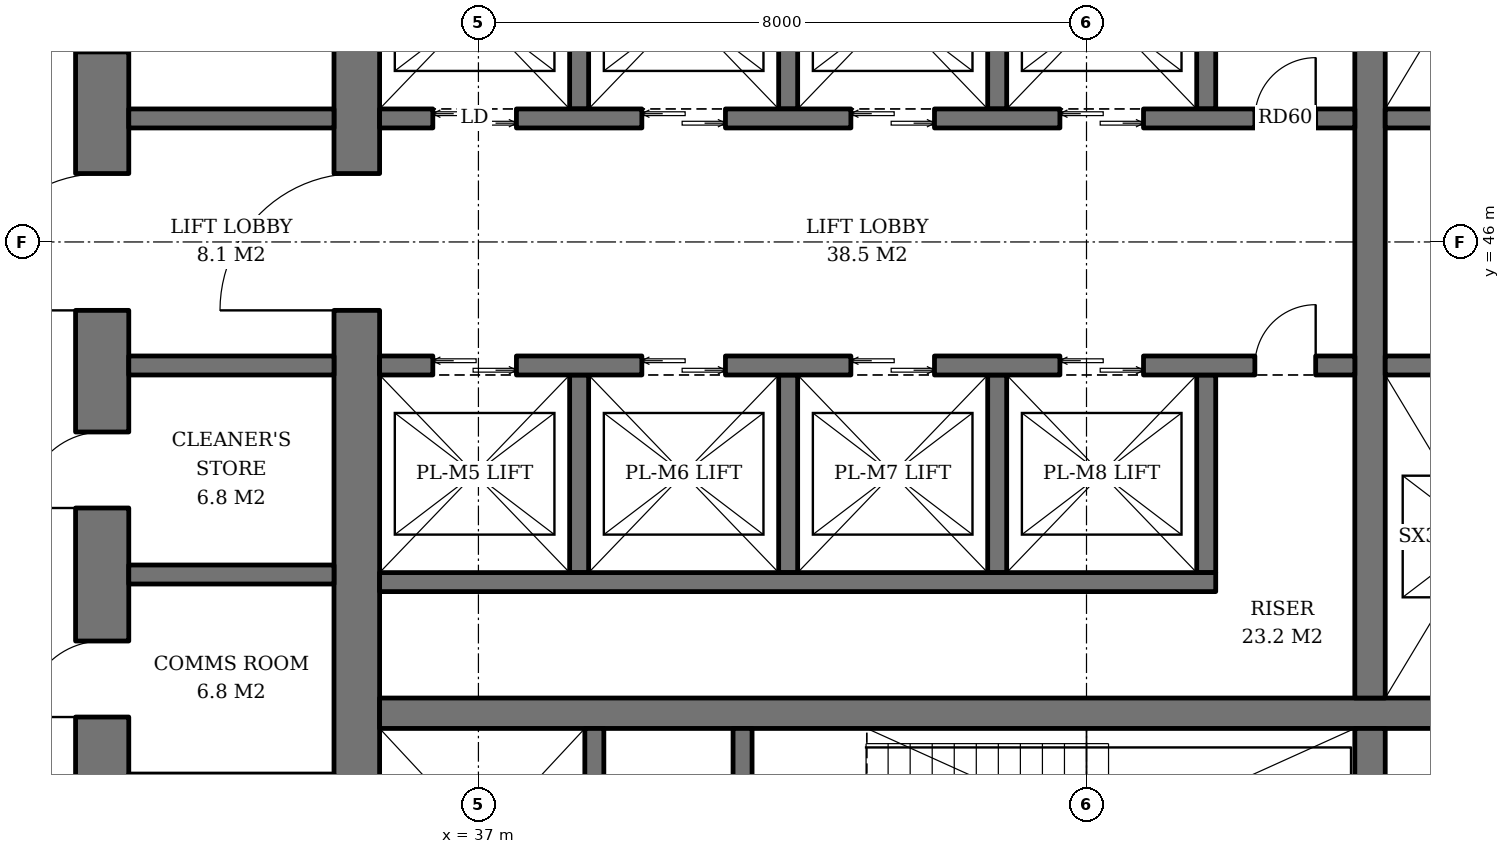
"""IFC4 building model, lengths in metres.
Left out: names, types, materials, properties, quantities, classifications, styles, units other than length and angle.
Written with IfcOpenShell. Run it as: python <this file> out.ifc"""

import sys

from ifc_helpers import new_model, si_unit, direction, frame, frame_2d, origin, place, context, subcontext, project, spatial, rectangle, extrude, element, fill, save


model = new_model("IFC4")
c1 = context("Model", 3, precision=1e-05, world=origin(), true_north=direction((0.0, 1.0)))
c2 = subcontext(c1, "Body", "Model", "MODEL_VIEW")
j1 = project(units=[si_unit("LENGTHUNIT", "METRE"), si_unit("PLANEANGLEUNIT", "RADIAN")], contexts=[c1])
p1 = place(None, origin())
s1 = spatial("IfcSite", under=j1, at=p1, CompositionType="ELEMENT")
p2 = place(p1, origin())
s2 = spatial("IfcBuilding", under=s1, at=p2, CompositionType="ELEMENT")
p3 = place(p2, frame((0.0, 0.0, 104.6)))
s3 = spatial("IfcBuildingStorey", under=s2, at=p3, CompositionType="ELEMENT", Elevation=104.6)
p4 = place(p3, frame((35.4, 36.7, 0.0), z_axis=(0.0, 0.0, 1.0), x_axis=(0.0, 1.0, 0.0)))
e1 = element("IfcWall", 1, at=p4, inside=s3, PredefinedType="SHEAR", context=c2, shape_type="SweptSolid", body=[
    extrude(rectangle(XDim=18.6, YDim=0.6, at=frame_2d((9.3, 0.0))), origin(), (0.0, 0.0, 1.0), 3.8),
])
p5 = place(p4, frame((8.4, 0.0, 0.0)))
e2 = element("IfcOpeningElement", 2, at=p5, cuts=e1, PredefinedType="OPENING", context=c2, shape_type="SweptSolid", body=[
    extrude(rectangle(XDim=1.8, YDim=2.4, at=frame_2d((0.9, 1.2))), frame((0.0, 0.31, 0.0), z_axis=(0.0, -1.0, 0.0), x_axis=(1.0, 0.0, 0.0)), (0.0, 0.0, 1.0), 0.62),
])
p6 = place(p3, frame((32.05, 33.4, 0.0), z_axis=(0.0, 0.0, 1.0), x_axis=(0.0, 1.0, 0.0)))
e3 = element("IfcWall", 3, at=p6, inside=s3, PredefinedType="SHEAR", context=c2, shape_type="SweptSolid", body=[
    extrude(rectangle(XDim=25.2, YDim=0.7, at=frame_2d((12.6, 0.0))), origin(), (0.0, 0.0, 1.0), 3.8),
])
p7 = place(p6, frame((11.7, 0.0, 0.0)))
e4 = element("IfcOpeningElement", 4, at=p7, cuts=e3, PredefinedType="OPENING", context=c2, shape_type="SweptSolid", body=[
    extrude(rectangle(XDim=1.8, YDim=2.4, at=frame_2d((0.9, 1.2))), frame((0.0, 0.36, 0.0), z_axis=(0.0, -1.0, 0.0), x_axis=(1.0, 0.0, 0.0)), (0.0, 0.0, 1.0), 0.72),
])
p8 = place(p6, frame((3.6, 0.0, 0.0)))
e5 = element("IfcOpeningElement", 5, at=p8, cuts=e3, PredefinedType="OPENING", context=c2, shape_type="SweptSolid", body=[
    extrude(rectangle(XDim=1.0, YDim=2.1, at=frame_2d((0.5, 1.05))), frame((0.0, 0.36, 0.0), z_axis=(0.0, -1.0, 0.0), x_axis=(1.0, 0.0, 0.0)), (0.0, 0.0, 1.0), 0.72),
])
p9 = place(p6, frame((6.35, 0.0, 0.0)))
e6 = element("IfcOpeningElement", 6, at=p9, cuts=e3, PredefinedType="OPENING", context=c2, shape_type="SweptSolid", body=[
    extrude(rectangle(XDim=1.0, YDim=2.1, at=frame_2d((0.5, 1.05))), frame((0.0, 0.36, 0.0), z_axis=(0.0, -1.0, 0.0), x_axis=(1.0, 0.0, 0.0)), (0.0, 0.0, 1.0), 0.72),
])
p10 = place(p6, frame((9.1, 0.0, 0.0)))
e7 = element("IfcOpeningElement", 7, at=p10, cuts=e3, PredefinedType="OPENING", context=c2, shape_type="SweptSolid", body=[
    extrude(rectangle(XDim=1.0, YDim=2.1, at=frame_2d((0.5, 1.05))), frame((0.0, 0.36, 0.0), z_axis=(0.0, -1.0, 0.0), x_axis=(1.0, 0.0, 0.0)), (0.0, 0.0, 1.0), 0.72),
])
p11 = place(p6, frame((15.1, 0.0, 0.0)))
e8 = element("IfcOpeningElement", 8, at=p11, cuts=e3, PredefinedType="OPENING", context=c2, shape_type="SweptSolid", body=[
    extrude(rectangle(XDim=1.0, YDim=2.1, at=frame_2d((0.5, 1.05))), frame((0.0, 0.36, 0.0), z_axis=(0.0, -1.0, 0.0), x_axis=(1.0, 0.0, 0.0)), (0.0, 0.0, 1.0), 0.72),
])
p12 = place(p6, frame((17.85, 0.0, 0.0)))
e9 = element("IfcOpeningElement", 9, at=p12, cuts=e3, PredefinedType="OPENING", context=c2, shape_type="SweptSolid", body=[
    extrude(rectangle(XDim=1.0, YDim=2.1, at=frame_2d((0.5, 1.05))), frame((0.0, 0.36, 0.0), z_axis=(0.0, -1.0, 0.0), x_axis=(1.0, 0.0, 0.0)), (0.0, 0.0, 1.0), 0.72),
])
p13 = place(p3, frame((35.7, 39.8, 0.0), z_axis=(0.0, 0.0, 1.0), x_axis=(1.0, 0.0, 0.0)))
e10 = element("IfcWall", 10, at=p13, inside=s3, PredefinedType="SHEAR", context=c2, shape_type="SweptSolid", body=[
    extrude(rectangle(XDim=18.6, YDim=0.4, at=frame_2d((9.3, 0.0))), origin(), (0.0, 0.0, 1.0), 3.8),
])
p14 = place(p3, frame((48.73, 36.7, 0.0), z_axis=(0.0, 0.0, 1.0), x_axis=(0.0, 1.0, 0.0)))
e11 = element("IfcWall", 11, at=p14, inside=s3, PredefinedType="SHEAR", context=c2, shape_type="SweptSolid", body=[
    extrude(rectangle(XDim=2.9, YDim=0.4, at=frame_2d((1.45, 0.0))), origin(), (0.0, 0.0, 1.0), 3.8),
])
p15 = place(p3, frame((48.73, 40.0, 0.0), z_axis=(0.0, 0.0, 1.0), x_axis=(0.0, 1.0, 0.0)))
e12 = element("IfcWall", 12, at=p15, inside=s3, PredefinedType="SHEAR", context=c2, shape_type="SweptSolid", body=[
    extrude(rectangle(XDim=12.0, YDim=0.4, at=frame_2d((6.0, 0.0))), origin(), (0.0, 0.0, 1.0), 3.8),
])
p16 = place(p3, frame((38.525, 36.7, 0.0), z_axis=(0.0, 0.0, 1.0), x_axis=(0.0, 1.0, 0.0)))
e13 = element("IfcWall", 13, at=p16, inside=s3, PredefinedType="SHEAR", context=c2, shape_type="SweptSolid", body=[
    extrude(rectangle(XDim=2.9, YDim=0.25, at=frame_2d((1.45, 0.0))), origin(), (0.0, 0.0, 1.0), 3.8),
])
p17 = place(p16, frame((0.8, 0.0, 0.0)))
e14 = element("IfcOpeningElement", 14, at=p17, cuts=e13, PredefinedType="OPENING", context=c2, shape_type="SweptSolid", body=[
    extrude(rectangle(XDim=1.3, YDim=2.2, at=frame_2d((0.65, 1.1))), frame((0.0, 0.135, 0.0), z_axis=(0.0, -1.0, 0.0), x_axis=(1.0, 0.0, 0.0)), (0.0, 0.0, 1.0), 0.27),
])
p18 = place(p3, frame((40.475, 36.7, 0.0), z_axis=(0.0, 0.0, 1.0), x_axis=(0.0, 1.0, 0.0)))
e15 = element("IfcWall", 15, at=p18, inside=s3, PredefinedType="SHEAR", context=c2, shape_type="SweptSolid", body=[
    extrude(rectangle(XDim=2.9, YDim=0.25, at=frame_2d((1.45, 0.0))), origin(), (0.0, 0.0, 1.0), 3.8),
])
p19 = place(p18, frame((0.75, 0.0, 0.0)))
e16 = element("IfcOpeningElement", 16, at=p19, cuts=e15, PredefinedType="OPENING", context=c2, shape_type="SweptSolid", body=[
    extrude(rectangle(XDim=1.2, YDim=2.1, at=frame_2d((0.6, 1.05))), frame((0.0, 0.135, 0.0), z_axis=(0.0, -1.0, 0.0), x_axis=(1.0, 0.0, 0.0)), (0.0, 0.0, 1.0), 0.27),
])
for number, where, z_axis, x_axis in (
    (17, (38.325, 47.75, 0.0), (0.0, 0.0, 1.0), (0.0, 1.0, 0.0)),
    (18, (41.075, 47.75, 0.0), (0.0, 0.0, 1.0), (0.0, 1.0, 0.0)),
    (19, (43.825, 47.75, 0.0), (0.0, 0.0, 1.0), (0.0, 1.0, 0.0)),
    (20, (46.575, 47.75, 0.0), (0.0, 0.0, 1.0), (0.0, 1.0, 0.0)),
):
    element("IfcWall", number, at=place(p3, frame(where, z_axis=z_axis, x_axis=x_axis)), inside=s3, PredefinedType="SHEAR", context=c2, shape_type="SweptSolid", body=[
        extrude(rectangle(XDim=2.6, YDim=0.25, at=frame_2d((1.3, 0.0))), origin(), (0.0, 0.0, 1.0), 3.8),
    ])
p20 = place(p3, frame((35.7, 47.625, 0.0), z_axis=(0.0, 0.0, 1.0), x_axis=(1.0, 0.0, 0.0)))
e21 = element("IfcWall", 21, at=p20, inside=s3, PredefinedType="SHEAR", context=c2, shape_type="SweptSolid", body=[
    extrude(rectangle(XDim=12.83, YDim=0.25, at=frame_2d((6.415, 0.0))), origin(), (0.0, 0.0, 1.0), 3.8),
])
p21 = place(p20, frame((0.7, 0.0, 0.0)))
e22 = element("IfcOpeningElement", 22, at=p21, cuts=e21, PredefinedType="OPENING", context=c2, shape_type="SweptSolid", body=[
    extrude(rectangle(XDim=1.1, YDim=2.2, at=frame_2d((0.55, 1.1))), frame((0.0, 0.135, 0.0), z_axis=(0.0, -1.0, 0.0), x_axis=(1.0, 0.0, 0.0)), (0.0, 0.0, 1.0), 0.27),
])
p22 = place(p20, frame((3.45, 0.0, 0.0)))
e23 = element("IfcOpeningElement", 23, at=p22, cuts=e21, PredefinedType="OPENING", context=c2, shape_type="SweptSolid", body=[
    extrude(rectangle(XDim=1.1, YDim=2.2, at=frame_2d((0.55, 1.1))), frame((0.0, 0.135, 0.0), z_axis=(0.0, -1.0, 0.0), x_axis=(1.0, 0.0, 0.0)), (0.0, 0.0, 1.0), 0.27),
])
p23 = place(p20, frame((6.2, 0.0, 0.0)))
e24 = element("IfcOpeningElement", 24, at=p23, cuts=e21, PredefinedType="OPENING", context=c2, shape_type="SweptSolid", body=[
    extrude(rectangle(XDim=1.1, YDim=2.2, at=frame_2d((0.55, 1.1))), frame((0.0, 0.135, 0.0), z_axis=(0.0, -1.0, 0.0), x_axis=(1.0, 0.0, 0.0)), (0.0, 0.0, 1.0), 0.27),
])
p24 = place(p20, frame((8.95, 0.0, 0.0)))
e25 = element("IfcOpeningElement", 25, at=p24, cuts=e21, PredefinedType="OPENING", context=c2, shape_type="SweptSolid", body=[
    extrude(rectangle(XDim=1.1, YDim=2.2, at=frame_2d((0.55, 1.1))), frame((0.0, 0.135, 0.0), z_axis=(0.0, -1.0, 0.0), x_axis=(1.0, 0.0, 0.0)), (0.0, 0.0, 1.0), 0.27),
])
p25 = place(p20, frame((11.515, 0.0, 0.0)))
e26 = element("IfcOpeningElement", 26, at=p25, cuts=e21, PredefinedType="OPENING", context=c2, shape_type="SweptSolid", body=[
    extrude(rectangle(XDim=0.8, YDim=2.0, at=frame_2d((0.4, 1.0))), frame((0.0, 0.135, 0.0), z_axis=(0.0, -1.0, 0.0), x_axis=(1.0, 0.0, 0.0)), (0.0, 0.0, 1.0), 0.27),
])
for number, where, z_axis, x_axis in (
    (27, (38.325, 44.25, 0.0), (0.0, 0.0, 1.0), (0.0, -1.0, 0.0)),
    (28, (41.075, 44.25, 0.0), (0.0, 0.0, 1.0), (0.0, -1.0, 0.0)),
    (29, (43.825, 44.25, 0.0), (0.0, 0.0, 1.0), (0.0, -1.0, 0.0)),
    (30, (46.575, 44.25, 0.0), (0.0, 0.0, 1.0), (0.0, -1.0, 0.0)),
):
    element("IfcWall", number, at=place(p3, frame(where, z_axis=z_axis, x_axis=x_axis)), inside=s3, PredefinedType="SHEAR", context=c2, shape_type="SweptSolid", body=[
        extrude(rectangle(XDim=2.6, YDim=0.25, at=frame_2d((1.3, 0.0))), origin(), (0.0, 0.0, 1.0), 3.8),
    ])
p26 = place(p3, frame((35.7, 41.525, 0.0), z_axis=(0.0, 0.0, 1.0), x_axis=(1.0, 0.0, 0.0)))
e31 = element("IfcWall", 31, at=p26, inside=s3, PredefinedType="SHEAR", context=c2, shape_type="SweptSolid", body=[
    extrude(rectangle(XDim=11.0, YDim=0.25, at=frame_2d((5.5, 0.0))), origin(), (0.0, 0.0, 1.0), 3.8),
])
p27 = place(p3, frame((35.7, 44.375, 0.0), z_axis=(0.0, 0.0, 1.0), x_axis=(1.0, 0.0, 0.0)))
e32 = element("IfcWall", 32, at=p27, inside=s3, PredefinedType="SHEAR", context=c2, shape_type="SweptSolid", body=[
    extrude(rectangle(XDim=12.83, YDim=0.25, at=frame_2d((6.415, 0.0))), origin(), (0.0, 0.0, 1.0), 3.8),
])
p28 = place(p27, frame((0.7, 0.0, 0.0)))
e33 = element("IfcOpeningElement", 33, at=p28, cuts=e32, PredefinedType="OPENING", context=c2, shape_type="SweptSolid", body=[
    extrude(rectangle(XDim=1.1, YDim=2.2, at=frame_2d((0.55, 1.1))), frame((0.0, 0.135, 0.0), z_axis=(0.0, -1.0, 0.0), x_axis=(1.0, 0.0, 0.0)), (0.0, 0.0, 1.0), 0.27),
])
p29 = place(p27, frame((3.45, 0.0, 0.0)))
e34 = element("IfcOpeningElement", 34, at=p29, cuts=e32, PredefinedType="OPENING", context=c2, shape_type="SweptSolid", body=[
    extrude(rectangle(XDim=1.1, YDim=2.2, at=frame_2d((0.55, 1.1))), frame((0.0, 0.135, 0.0), z_axis=(0.0, -1.0, 0.0), x_axis=(1.0, 0.0, 0.0)), (0.0, 0.0, 1.0), 0.27),
])
p30 = place(p27, frame((6.2, 0.0, 0.0)))
e35 = element("IfcOpeningElement", 35, at=p30, cuts=e32, PredefinedType="OPENING", context=c2, shape_type="SweptSolid", body=[
    extrude(rectangle(XDim=1.1, YDim=2.2, at=frame_2d((0.55, 1.1))), frame((0.0, 0.135, 0.0), z_axis=(0.0, -1.0, 0.0), x_axis=(1.0, 0.0, 0.0)), (0.0, 0.0, 1.0), 0.27),
])
p31 = place(p27, frame((8.95, 0.0, 0.0)))
e36 = element("IfcOpeningElement", 36, at=p31, cuts=e32, PredefinedType="OPENING", context=c2, shape_type="SweptSolid", body=[
    extrude(rectangle(XDim=1.1, YDim=2.2, at=frame_2d((0.55, 1.1))), frame((0.0, 0.135, 0.0), z_axis=(0.0, -1.0, 0.0), x_axis=(1.0, 0.0, 0.0)), (0.0, 0.0, 1.0), 0.27),
])
p32 = place(p27, frame((11.515, 0.0, 0.0)))
e37 = element("IfcOpeningElement", 37, at=p32, cuts=e32, PredefinedType="OPENING", context=c2, shape_type="SweptSolid", body=[
    extrude(rectangle(XDim=0.8, YDim=2.0, at=frame_2d((0.4, 1.0))), frame((0.0, 0.135, 0.0), z_axis=(0.0, -1.0, 0.0), x_axis=(1.0, 0.0, 0.0)), (0.0, 0.0, 1.0), 0.27),
])
for number, where, z_axis, x_axis in (
    (38, (48.93, 47.625, 0.0), (0.0, 0.0, 1.0), (1.0, 0.0, 0.0)),
    (39, (48.93, 44.375, 0.0), (0.0, 0.0, 1.0), (1.0, 0.0, 0.0)),
):
    element("IfcWall", number, at=place(p3, frame(where, z_axis=z_axis, x_axis=x_axis)), inside=s3, PredefinedType="SHEAR", context=c2, shape_type="SweptSolid", body=[
        extrude(rectangle(XDim=5.37, YDim=0.25, at=frame_2d((2.685, 0.0))), origin(), (0.0, 0.0, 1.0), 3.8),
    ])
for number, where, z_axis, x_axis in (
    (40, (32.4, 41.625, 0.0), (0.0, 0.0, 1.0), (1.0, 0.0, 0.0)),
    (41, (32.4, 44.375, 0.0), (0.0, 0.0, 1.0), (1.0, 0.0, 0.0)),
    (42, (32.4, 47.625, 0.0), (0.0, 0.0, 1.0), (1.0, 0.0, 0.0)),
):
    element("IfcWall", number, at=place(p3, frame(where, z_axis=z_axis, x_axis=x_axis)), inside=s3, PredefinedType="SHEAR", context=c2, shape_type="SweptSolid", body=[
        extrude(rectangle(XDim=2.7, YDim=0.25, at=frame_2d((1.35, 0.0))), origin(), (0.0, 0.0, 1.0), 3.8),
    ])
p33 = place(p21, origin())
e43 = element("IfcDoor", 43, at=p33, inside=s3, OperationType="DOUBLE_DOOR_SLIDING", PredefinedType="DOOR", context=c2, shape_type="SweptSolid", body=[
    extrude(rectangle(XDim=1.1, YDim=2.2, at=frame_2d((0.55, 1.1))), frame((0.0, 0.025, 0.0), z_axis=(0.0, -1.0, 0.0), x_axis=(1.0, 0.0, 0.0)), (0.0, 0.0, 1.0), 0.05),
])
fill(e22, e43)
p34 = place(p22, origin())
e44 = element("IfcDoor", 44, at=p34, inside=s3, OperationType="DOUBLE_DOOR_SLIDING", PredefinedType="DOOR", context=c2, shape_type="SweptSolid", body=[
    extrude(rectangle(XDim=1.1, YDim=2.2, at=frame_2d((0.55, 1.1))), frame((0.0, 0.025, 0.0), z_axis=(0.0, -1.0, 0.0), x_axis=(1.0, 0.0, 0.0)), (0.0, 0.0, 1.0), 0.05),
])
fill(e23, e44)
p35 = place(p23, origin())
e45 = element("IfcDoor", 45, at=p35, inside=s3, OperationType="DOUBLE_DOOR_SLIDING", PredefinedType="DOOR", context=c2, shape_type="SweptSolid", body=[
    extrude(rectangle(XDim=1.1, YDim=2.2, at=frame_2d((0.55, 1.1))), frame((0.0, 0.025, 0.0), z_axis=(0.0, -1.0, 0.0), x_axis=(1.0, 0.0, 0.0)), (0.0, 0.0, 1.0), 0.05),
])
fill(e24, e45)
p36 = place(p24, origin())
e46 = element("IfcDoor", 46, at=p36, inside=s3, OperationType="DOUBLE_DOOR_SLIDING", PredefinedType="DOOR", context=c2, shape_type="SweptSolid", body=[
    extrude(rectangle(XDim=1.1, YDim=2.2, at=frame_2d((0.55, 1.1))), frame((0.0, 0.025, 0.0), z_axis=(0.0, -1.0, 0.0), x_axis=(1.0, 0.0, 0.0)), (0.0, 0.0, 1.0), 0.05),
])
fill(e25, e46)
p37 = place(p25, origin())
e47 = element("IfcDoor", 47, at=p37, inside=s3, OperationType="SINGLE_SWING_RIGHT", PredefinedType="DOOR", context=c2, shape_type="SweptSolid", body=[
    extrude(rectangle(XDim=0.8, YDim=2.0, at=frame_2d((0.4, 1.0))), frame((0.0, 0.025, 0.0), z_axis=(0.0, -1.0, 0.0), x_axis=(1.0, 0.0, 0.0)), (0.0, 0.0, 1.0), 0.05),
])
fill(e26, e47)
p38 = place(p28, origin())
e48 = element("IfcDoor", 48, at=p38, inside=s3, OperationType="DOUBLE_DOOR_SLIDING", PredefinedType="DOOR", context=c2, shape_type="SweptSolid", body=[
    extrude(rectangle(XDim=1.1, YDim=2.2, at=frame_2d((0.55, 1.1))), frame((0.0, 0.025, 0.0), z_axis=(0.0, -1.0, 0.0), x_axis=(1.0, 0.0, 0.0)), (0.0, 0.0, 1.0), 0.05),
])
fill(e33, e48)
p39 = place(p29, origin())
e49 = element("IfcDoor", 49, at=p39, inside=s3, OperationType="DOUBLE_DOOR_SLIDING", PredefinedType="DOOR", context=c2, shape_type="SweptSolid", body=[
    extrude(rectangle(XDim=1.1, YDim=2.2, at=frame_2d((0.55, 1.1))), frame((0.0, 0.025, 0.0), z_axis=(0.0, -1.0, 0.0), x_axis=(1.0, 0.0, 0.0)), (0.0, 0.0, 1.0), 0.05),
])
fill(e34, e49)
p40 = place(p30, origin())
e50 = element("IfcDoor", 50, at=p40, inside=s3, OperationType="DOUBLE_DOOR_SLIDING", PredefinedType="DOOR", context=c2, shape_type="SweptSolid", body=[
    extrude(rectangle(XDim=1.1, YDim=2.2, at=frame_2d((0.55, 1.1))), frame((0.0, 0.025, 0.0), z_axis=(0.0, -1.0, 0.0), x_axis=(1.0, 0.0, 0.0)), (0.0, 0.0, 1.0), 0.05),
])
fill(e35, e50)
p41 = place(p31, origin())
e51 = element("IfcDoor", 51, at=p41, inside=s3, OperationType="DOUBLE_DOOR_SLIDING", PredefinedType="DOOR", context=c2, shape_type="SweptSolid", body=[
    extrude(rectangle(XDim=1.1, YDim=2.2, at=frame_2d((0.55, 1.1))), frame((0.0, 0.025, 0.0), z_axis=(0.0, -1.0, 0.0), x_axis=(1.0, 0.0, 0.0)), (0.0, 0.0, 1.0), 0.05),
])
fill(e36, e51)
p42 = place(p32, origin())
e52 = element("IfcDoor", 52, at=p42, inside=s3, OperationType="SINGLE_SWING_RIGHT", PredefinedType="DOOR", context=c2, shape_type="SweptSolid", body=[
    extrude(rectangle(XDim=0.8, YDim=2.0, at=frame_2d((0.4, 1.0))), frame((0.0, 0.025, 0.0), z_axis=(0.0, -1.0, 0.0), x_axis=(1.0, 0.0, 0.0)), (0.0, 0.0, 1.0), 0.05),
])
fill(e37, e52)
p43 = place(p5, origin())
e53 = element("IfcDoor", 53, at=p43, inside=s3, OperationType="DOUBLE_DOOR_SINGLE_SWING", PredefinedType="DOOR", context=c2, shape_type="SweptSolid", body=[
    extrude(rectangle(XDim=1.8, YDim=2.4, at=frame_2d((0.9, 1.2))), frame((0.0, 0.025, 0.0), z_axis=(0.0, -1.0, 0.0), x_axis=(1.0, 0.0, 0.0)), (0.0, 0.0, 1.0), 0.05),
])
fill(e2, e53)
p44 = place(p7, origin())
e54 = element("IfcDoor", 54, at=p44, inside=s3, OperationType="DOUBLE_DOOR_SINGLE_SWING", PredefinedType="DOOR", context=c2, shape_type="SweptSolid", body=[
    extrude(rectangle(XDim=1.8, YDim=2.4, at=frame_2d((0.9, 1.2))), frame((0.0, 0.025, 0.0), z_axis=(0.0, -1.0, 0.0), x_axis=(1.0, 0.0, 0.0)), (0.0, 0.0, 1.0), 0.05),
])
fill(e4, e54)
p45 = place(p9, origin())
e55 = element("IfcDoor", 55, at=p45, inside=s3, OperationType="SINGLE_SWING_LEFT", PredefinedType="DOOR", context=c2, shape_type="SweptSolid", body=[
    extrude(rectangle(XDim=1.0, YDim=2.1, at=frame_2d((0.5, 1.05))), frame((0.0, -0.29, 0.0), z_axis=(0.0, -1.0, 0.0), x_axis=(1.0, 0.0, 0.0)), (0.0, 0.0, 1.0), 0.05),
])
fill(e6, e55)
p46 = place(p10, origin())
e56 = element("IfcDoor", 56, at=p46, inside=s3, OperationType="SINGLE_SWING_LEFT", PredefinedType="DOOR", context=c2, shape_type="SweptSolid", body=[
    extrude(rectangle(XDim=1.0, YDim=2.1, at=frame_2d((0.5, 1.05))), frame((0.0, -0.29, 0.0), z_axis=(0.0, -1.0, 0.0), x_axis=(1.0, 0.0, 0.0)), (0.0, 0.0, 1.0), 0.05),
])
fill(e7, e56)
save(model, sys.argv[1])
